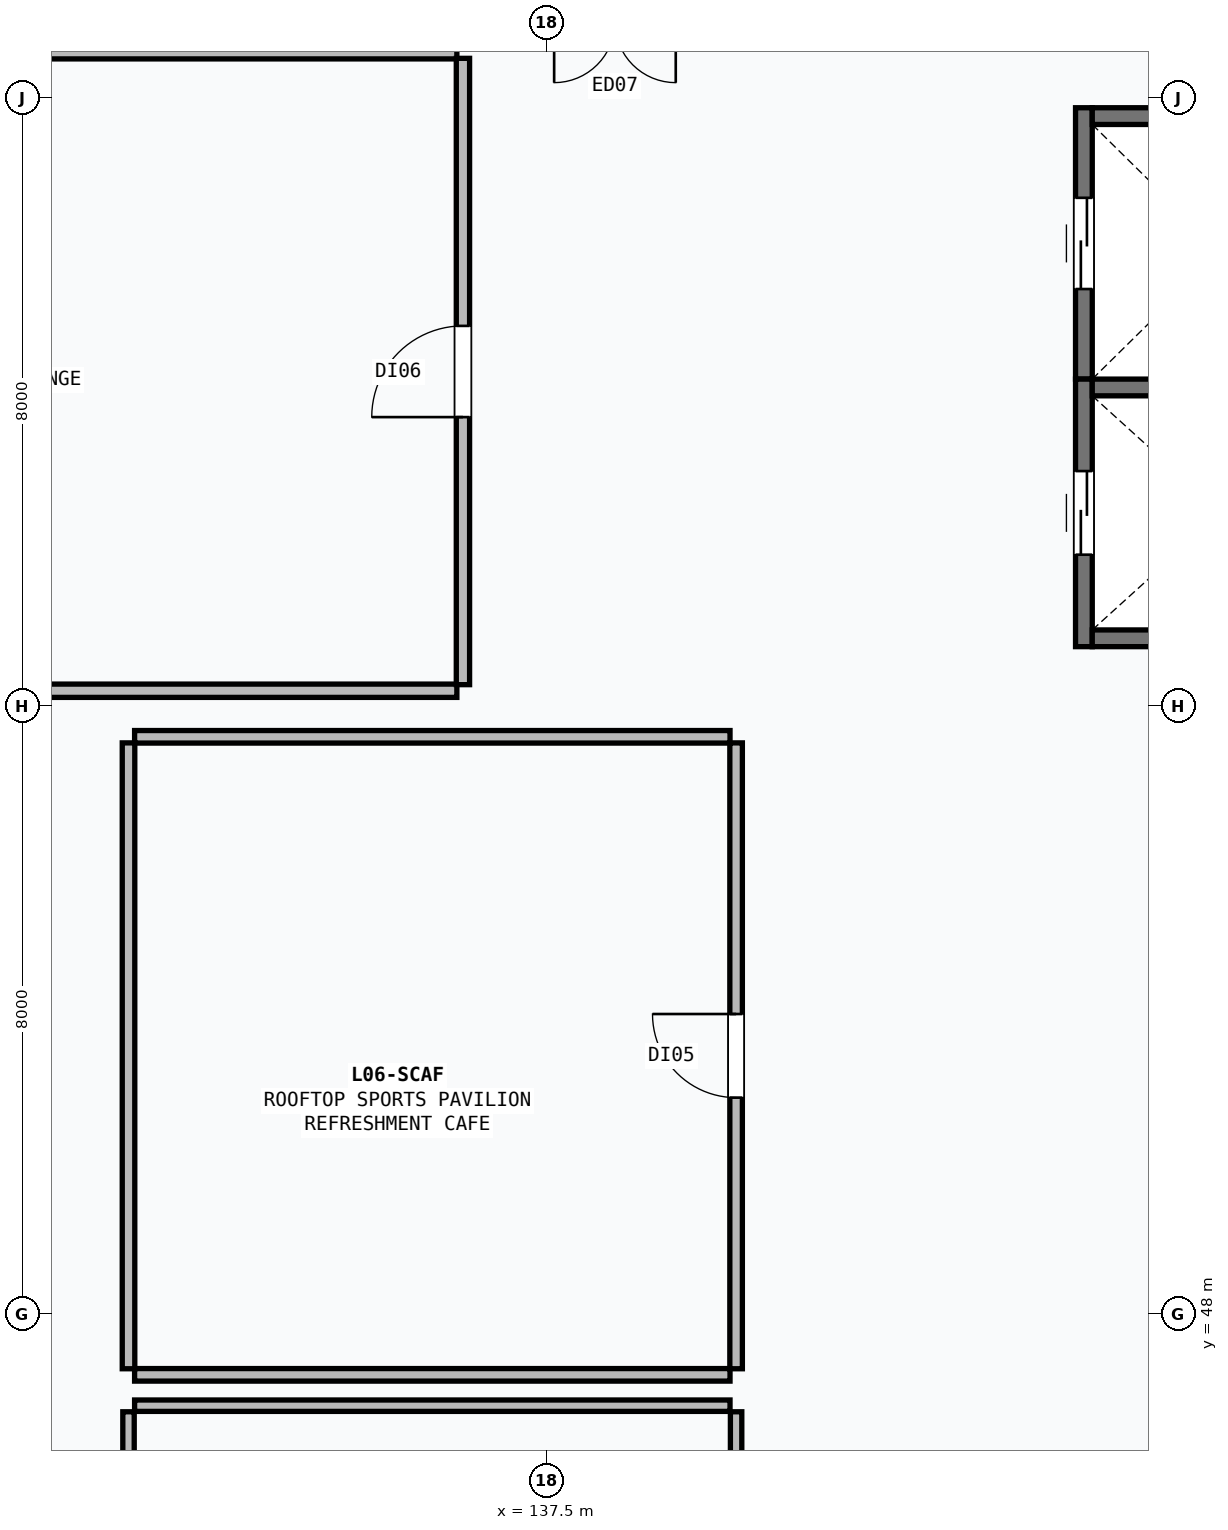
"""IFC4 building model, lengths in metres.
Left out: names, types, materials, properties, quantities, classifications, styles, units other than length and angle.
Written with IfcOpenShell. Run it as: python <this file> out.ifc"""

import sys

from ifc_helpers import new_model, si_unit, direction, frame, frame_2d, origin, place, context, subcontext, project, spatial, rectangle, extrude, element, fill, save


model = new_model("IFC4")
c1 = context("Model", 3, precision=1e-05, world=origin(), true_north=direction((0.0, 1.0)))
c2 = subcontext(c1, "Body", "Model", "MODEL_VIEW")
j1 = project(units=[si_unit("LENGTHUNIT", "METRE"), si_unit("PLANEANGLEUNIT", "RADIAN")], contexts=[c1])
p1 = place(None, origin())
s1 = spatial("IfcSite", under=j1, at=p1, CompositionType="ELEMENT")
p2 = place(p1, origin())
s2 = spatial("IfcBuilding", under=s1, at=p2, CompositionType="ELEMENT")
p3 = place(p2, frame((0.0, 0.0, 22.8)))
s3 = spatial("IfcBuildingStorey", under=s2, at=p3, CompositionType="ELEMENT", Elevation=22.8)
p4 = place(p3, frame((144.57, 60.3, 0.0), z_axis=(0.0, 0.0, 1.0), x_axis=(0.0, 1.0, 0.0)))
e1 = element("IfcWall", 1, at=p4, inside=s3, PredefinedType="SHEAR", context=c2, shape_type="SweptSolid", body=[
    extrude(rectangle(XDim=3.57, YDim=0.22, at=frame_2d((1.785, 0.0))), origin(), (0.0, 0.0, 1.0), 4.2),
])
p5 = place(p4, frame((1.185, 0.0, 0.0)))
e2 = element("IfcOpeningElement", 2, at=p5, cuts=e1, PredefinedType="OPENING", context=c2, shape_type="SweptSolid", body=[
    extrude(rectangle(XDim=1.2, YDim=2.2, at=frame_2d((0.6, 1.1))), frame((0.0, 0.12, 0.0), z_axis=(0.0, -1.0, 0.0), x_axis=(1.0, 0.0, 0.0)), (0.0, 0.0, 1.0), 0.24),
])
p6 = place(p3, frame((144.68, 63.76, 0.0), z_axis=(0.0, 0.0, 1.0), x_axis=(1.0, 0.0, 0.0)))
e3 = element("IfcWall", 3, at=p6, inside=s3, PredefinedType="SHEAR", context=c2, shape_type="SweptSolid", body=[
    extrude(rectangle(XDim=3.4, YDim=0.22, at=frame_2d((1.7, 0.0))), origin(), (0.0, 0.0, 1.0), 4.2),
])
p7 = place(p3, frame((144.57, 56.78, 0.0), z_axis=(0.0, 0.0, 1.0), x_axis=(0.0, 1.0, 0.0)))
e4 = element("IfcWall", 4, at=p7, inside=s3, PredefinedType="SHEAR", context=c2, shape_type="SweptSolid", body=[
    extrude(rectangle(XDim=3.52, YDim=0.22, at=frame_2d((1.76, 0.0))), origin(), (0.0, 0.0, 1.0), 4.2),
])
p8 = place(p7, frame((1.21, 0.0, 0.0)))
e5 = element("IfcOpeningElement", 5, at=p8, cuts=e4, PredefinedType="OPENING", context=c2, shape_type="SweptSolid", body=[
    extrude(rectangle(XDim=1.1, YDim=2.2, at=frame_2d((0.55, 1.1))), frame((0.0, 0.12, 0.0), z_axis=(0.0, -1.0, 0.0), x_axis=(1.0, 0.0, 0.0)), (0.0, 0.0, 1.0), 0.24),
])
for number, where, z_axis, x_axis in (
    (6, (148.08, 56.89, 0.0), (0.0, 0.0, 1.0), (-1.0, 0.0, 0.0)),
    (7, (144.68, 60.19, 0.0), (0.0, 0.0, 1.0), (1.0, 0.0, 0.0)),
):
    element("IfcWall", number, at=place(p3, frame(where, z_axis=z_axis, x_axis=x_axis)), inside=s3, PredefinedType="SHEAR", context=c2, shape_type="SweptSolid", body=[
        extrude(rectangle(XDim=3.4, YDim=0.22, at=frame_2d((1.7, 0.0))), origin(), (0.0, 0.0, 1.0), 4.2),
    ])
p9 = place(p3, frame((132.08, 46.794, 0.0), z_axis=(0.0, 0.0, 1.0), x_axis=(1.0, 0.0, 0.0)))
e8 = element("IfcWall", 8, at=p9, inside=s3, PredefinedType="PARTITIONING", context=c2, shape_type="SweptSolid", body=[
    extrude(rectangle(XDim=7.834, YDim=0.15, at=frame_2d((3.917, 0.0))), origin(), (0.0, 0.0, 1.0), 3.945),
])
p10 = place(p3, frame((132.0, 38.48, 0.0), z_axis=(0.0, 0.0, 1.0), x_axis=(0.0, 1.0, 0.0)))
e9 = element("IfcWall", 9, at=p10, inside=s3, PredefinedType="PARTITIONING", context=c2, shape_type="SweptSolid", body=[
    extrude(rectangle(XDim=8.234, YDim=0.15, at=frame_2d((4.117, 0.0))), origin(), (0.0, 0.0, 1.0), 3.495),
])
p11 = place(p10, frame((3.592, 0.0, 0.0)))
e10 = element("IfcOpeningElement", 10, at=p11, cuts=e9, PredefinedType="OPENING", context=c2, shape_type="SweptSolid", body=[
    extrude(rectangle(XDim=1.05, YDim=2.1, at=frame_2d((0.525, 1.05))), frame((0.0, 0.085, 0.0), z_axis=(0.0, -1.0, 0.0), x_axis=(1.0, 0.0, 0.0)), (0.0, 0.0, 1.0), 0.17),
])
p12 = place(p3, frame((139.994, 38.48, 0.0), z_axis=(0.0, 0.0, 1.0), x_axis=(0.0, 1.0, 0.0)))
e11 = element("IfcWall", 11, at=p12, inside=s3, PredefinedType="PARTITIONING", context=c2, shape_type="SweptSolid", body=[
    extrude(rectangle(XDim=8.234, YDim=0.15, at=frame_2d((4.117, 0.0))), origin(), (0.0, 0.0, 1.0), 3.495),
])
for number, where, z_axis, x_axis in (
    (12, (132.08, 47.2, 0.0), (0.0, 0.0, 1.0), (1.0, 0.0, 0.0)),
    (13, (132.08, 55.594, 0.0), (0.0, 0.0, 1.0), (1.0, 0.0, 0.0)),
):
    element("IfcWall", number, at=place(p3, frame(where, z_axis=z_axis, x_axis=x_axis)), inside=s3, PredefinedType="PARTITIONING", context=c2, shape_type="SweptSolid", body=[
        extrude(rectangle(XDim=7.834, YDim=0.165, at=frame_2d((3.917, 0.0))), origin(), (0.0, 0.0, 1.0), 3.945),
    ])
p13 = place(p3, frame((132.0, 47.28, 0.0), z_axis=(0.0, 0.0, 1.0), x_axis=(0.0, 1.0, 0.0)))
e14 = element("IfcWall", 14, at=p13, inside=s3, PredefinedType="PARTITIONING", context=c2, shape_type="SweptSolid", body=[
    extrude(rectangle(XDim=8.234, YDim=0.165, at=frame_2d((4.117, 0.0))), origin(), (0.0, 0.0, 1.0), 3.945),
])
p14 = place(p3, frame((139.994, 47.28, 0.0), z_axis=(0.0, 0.0, 1.0), x_axis=(0.0, 1.0, 0.0)))
e15 = element("IfcWall", 15, at=p14, inside=s3, PredefinedType="PARTITIONING", context=c2, shape_type="SweptSolid", body=[
    extrude(rectangle(XDim=8.234, YDim=0.165, at=frame_2d((4.117, 0.0))), origin(), (0.0, 0.0, 1.0), 3.945),
])
p15 = place(p14, frame((3.567, 0.0, 0.0)))
e16 = element("IfcOpeningElement", 16, at=p15, cuts=e15, PredefinedType="OPENING", context=c2, shape_type="SweptSolid", body=[
    extrude(rectangle(XDim=1.1, YDim=2.1, at=frame_2d((0.55, 1.05))), frame((0.0, 0.093, 0.0), z_axis=(0.0, -1.0, 0.0), x_axis=(1.0, 0.0, 0.0)), (0.0, 0.0, 1.0), 0.185),
])
p16 = place(p3, frame((112.48, 56.2, 0.0), z_axis=(0.0, 0.0, 1.0), x_axis=(1.0, 0.0, 0.0)))
e17 = element("IfcWall", 17, at=p16, inside=s3, PredefinedType="PARTITIONING", context=c2, shape_type="SweptSolid", body=[
    extrude(rectangle(XDim=23.84, YDim=0.175, at=frame_2d((11.92, 0.0))), origin(), (0.0, 0.0, 1.0), 3.115),
])
p17 = place(p3, frame((112.48, 64.6, 0.0), z_axis=(0.0, 0.0, 1.0), x_axis=(1.0, 0.0, 0.0)))
e18 = element("IfcWall", 18, at=p17, inside=s3, PredefinedType="PARTITIONING", context=c2, shape_type="SweptSolid", body=[
    extrude(rectangle(XDim=23.84, YDim=0.175, at=frame_2d((11.92, 0.0))), origin(), (0.0, 0.0, 1.0), 3.945),
])
p18 = place(p3, frame((136.4, 56.28, 0.0), z_axis=(0.0, 0.0, 1.0), x_axis=(0.0, 1.0, 0.0)))
e19 = element("IfcWall", 19, at=p18, inside=s3, PredefinedType="PARTITIONING", context=c2, shape_type="SweptSolid", body=[
    extrude(rectangle(XDim=8.24, YDim=0.175, at=frame_2d((4.12, 0.0))), origin(), (0.0, 0.0, 1.0), 3.945),
])
p19 = place(p18, frame((3.52, 0.0, 0.0)))
e20 = element("IfcOpeningElement", 20, at=p19, cuts=e19, PredefinedType="OPENING", context=c2, shape_type="SweptSolid", body=[
    extrude(rectangle(XDim=1.2, YDim=2.15, at=frame_2d((0.6, 1.075))), frame((0.0, 0.098, 0.0), z_axis=(0.0, -1.0, 0.0), x_axis=(1.0, 0.0, 0.0)), (0.0, 0.0, 1.0), 0.195),
])
p20 = place(p5, origin())
e21 = element("IfcDoor", 21, at=p20, inside=s3, OperationType="DOUBLE_DOOR_SLIDING", PredefinedType="DOOR", context=c2, shape_type="SweptSolid", body=[
    extrude(rectangle(XDim=1.2, YDim=2.2, at=frame_2d((0.6, 1.1))), frame((0.0, 0.025, 0.0), z_axis=(0.0, -1.0, 0.0), x_axis=(1.0, 0.0, 0.0)), (0.0, 0.0, 1.0), 0.05),
])
fill(e2, e21)
p21 = place(p8, origin())
e22 = element("IfcDoor", 22, at=p21, inside=s3, OperationType="DOUBLE_DOOR_SLIDING", PredefinedType="DOOR", context=c2, shape_type="SweptSolid", body=[
    extrude(rectangle(XDim=1.1, YDim=2.2, at=frame_2d((0.55, 1.1))), frame((0.0, 0.025, 0.0), z_axis=(0.0, -1.0, 0.0), x_axis=(1.0, 0.0, 0.0)), (0.0, 0.0, 1.0), 0.05),
])
fill(e5, e22)
p22 = place(p15, origin())
e23 = element("IfcDoor", 23, at=p22, inside=s3, OperationType="SINGLE_SWING_RIGHT", PredefinedType="DOOR", context=c2, shape_type="SweptSolid", body=[
    extrude(rectangle(XDim=1.1, YDim=2.1, at=frame_2d((0.55, 1.05))), frame((0.0, 0.025, 0.0), z_axis=(0.0, -1.0, 0.0), x_axis=(1.0, 0.0, 0.0)), (0.0, 0.0, 1.0), 0.05),
])
fill(e16, e23)
p23 = place(p19, origin())
e24 = element("IfcDoor", 24, at=p23, inside=s3, OperationType="SINGLE_SWING_LEFT", PredefinedType="DOOR", context=c2, shape_type="SweptSolid", body=[
    extrude(rectangle(XDim=1.2, YDim=2.15, at=frame_2d((0.6, 1.075))), frame((0.0, 0.025, 0.0), z_axis=(0.0, -1.0, 0.0), x_axis=(1.0, 0.0, 0.0)), (0.0, 0.0, 1.0), 0.05),
])
fill(e20, e24)
save(model, sys.argv[1])
